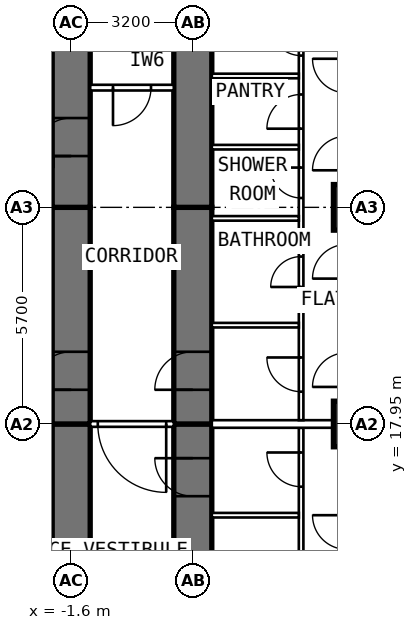
"""IFC4 building model, lengths in metres.
Left out: names, types, materials, properties, quantities, classifications, styles, units other than length and angle.
Written with IfcOpenShell. Run it as: python <this file> out.ifc"""

import sys

from ifc_helpers import new_model, si_unit, direction, frame, frame_2d, origin, origin_2d, place, context, subcontext, project, spatial, rectangle, extrude, element, fill, save


model = new_model("IFC4")
c1 = context("Model", 3, precision=1e-05, world=origin(), true_north=direction((0.0, 1.0)))
c2 = subcontext(c1, "Body", "Model", "MODEL_VIEW")
j1 = project(units=[si_unit("LENGTHUNIT", "METRE"), si_unit("PLANEANGLEUNIT", "RADIAN")], contexts=[c1])
p1 = place(None, origin())
s1 = spatial("IfcSite", under=j1, at=p1, CompositionType="ELEMENT")
p2 = place(p1, origin())
s2 = spatial("IfcBuilding", under=s1, at=p2, CompositionType="ELEMENT")
p3 = place(p2, frame((0.0, 0.0, 102.4)))
s3 = spatial("IfcBuildingStorey", under=s2, at=p3, CompositionType="ELEMENT", Elevation=102.4)
for number, where, z_axis, x_axis in (
    (1, (5.9, 17.95, 0.0), (0.0, 0.0, 1.0), (0.0, 1.0, 0.0)),
    (2, (5.9, 23.65, 0.0), (0.0, 0.0, 1.0), (0.0, 1.0, 0.0)),
):
    element("IfcColumn", number, at=place(p3, frame(where, z_axis=z_axis, x_axis=x_axis)), inside=s3, PredefinedType="COLUMN", context=c2, shape_type="SweptSolid", body=[
        extrude(rectangle(XDim=1.2, YDim=1.2, at=origin_2d()), origin(), (0.0, 0.0, 1.0), 3.6),
    ])
p4 = place(p3, frame((-1.6, 9.6, 0.0), z_axis=(0.0, 0.0, 1.0), x_axis=(0.0, 1.0, 0.0)))
e3 = element("IfcWall", 3, at=p4, inside=s3, PredefinedType="SHEAR", context=c2, shape_type="SweptSolid", body=[
    extrude(rectangle(XDim=8.35, YDim=1.0, at=frame_2d((4.175, 0.0))), origin(), (0.0, 0.0, 1.0), 3.6),
])
p5 = place(p4, frame((1.3, 0.0, 0.0)))
e4 = element("IfcOpeningElement", 4, at=p5, cuts=e3, PredefinedType="OPENING", context=c2, shape_type="SweptSolid", body=[
    extrude(rectangle(XDim=1.0, YDim=2.1, at=frame_2d((0.5, 1.05))), frame((0.0, 0.512, 0.0), z_axis=(0.0, -1.0, 0.0), x_axis=(1.0, 0.0, 0.0)), (0.0, 0.0, 1.0), 1.024),
])
p6 = place(p3, frame((-1.6, 17.95, 0.0), z_axis=(0.0, 0.0, 1.0), x_axis=(0.0, 1.0, 0.0)))
e5 = element("IfcWall", 5, at=p6, inside=s3, PredefinedType="SHEAR", context=c2, shape_type="SweptSolid", body=[
    extrude(rectangle(XDim=5.7, YDim=1.0, at=frame_2d((2.85, 0.0))), origin(), (0.0, 0.0, 1.0), 3.6),
])
p7 = place(p6, frame((0.9, 0.0, 0.0)))
e6 = element("IfcOpeningElement", 6, at=p7, cuts=e5, PredefinedType="OPENING", context=c2, shape_type="SweptSolid", body=[
    extrude(rectangle(XDim=1.0, YDim=2.1, at=frame_2d((0.5, 1.05))), frame((0.0, 0.512, 0.0), z_axis=(0.0, -1.0, 0.0), x_axis=(1.0, 0.0, 0.0)), (0.0, 0.0, 1.0), 1.024),
])
p8 = place(p3, frame((-1.6, 23.65, 0.0), z_axis=(0.0, 0.0, 1.0), x_axis=(0.0, 1.0, 0.0)))
e7 = element("IfcWall", 7, at=p8, inside=s3, PredefinedType="SHEAR", context=c2, shape_type="SweptSolid", body=[
    extrude(rectangle(XDim=10.745, YDim=1.0, at=frame_2d((5.373, 0.0))), origin(), (0.0, 0.0, 1.0), 3.6),
])
p9 = place(p8, frame((1.35, 0.0, 0.0)))
e8 = element("IfcOpeningElement", 8, at=p9, cuts=e7, PredefinedType="OPENING", context=c2, shape_type="SweptSolid", body=[
    extrude(rectangle(XDim=1.0, YDim=2.1, at=frame_2d((0.5, 1.05))), frame((0.0, 0.512, 0.0), z_axis=(0.0, -1.0, 0.0), x_axis=(1.0, 0.0, 0.0)), (0.0, 0.0, 1.0), 1.024),
])
p10 = place(p3, frame((1.6, 9.6, 0.0), z_axis=(0.0, 0.0, 1.0), x_axis=(0.0, 1.0, 0.0)))
e9 = element("IfcWall", 9, at=p10, inside=s3, PredefinedType="SHEAR", context=c2, shape_type="SweptSolid", body=[
    extrude(rectangle(XDim=8.35, YDim=1.0, at=frame_2d((4.175, 0.0))), origin(), (0.0, 0.0, 1.0), 3.6),
])
p11 = place(p10, frame((6.45, 0.0, 0.0)))
e10 = element("IfcOpeningElement", 10, at=p11, cuts=e9, PredefinedType="OPENING", context=c2, shape_type="SweptSolid", body=[
    extrude(rectangle(XDim=1.0, YDim=2.1, at=frame_2d((0.5, 1.05))), frame((0.0, 0.512, 0.0), z_axis=(0.0, -1.0, 0.0), x_axis=(1.0, 0.0, 0.0)), (0.0, 0.0, 1.0), 1.024),
])
p12 = place(p3, frame((1.6, 17.95, 0.0), z_axis=(0.0, 0.0, 1.0), x_axis=(0.0, 1.0, 0.0)))
e11 = element("IfcWall", 11, at=p12, inside=s3, PredefinedType="SHEAR", context=c2, shape_type="SweptSolid", body=[
    extrude(rectangle(XDim=5.7, YDim=1.0, at=frame_2d((2.85, 0.0))), origin(), (0.0, 0.0, 1.0), 3.6),
])
p13 = place(p12, frame((0.9, 0.0, 0.0)))
e12 = element("IfcOpeningElement", 12, at=p13, cuts=e11, PredefinedType="OPENING", context=c2, shape_type="SweptSolid", body=[
    extrude(rectangle(XDim=1.0, YDim=2.1, at=frame_2d((0.5, 1.05))), frame((0.0, 0.512, 0.0), z_axis=(0.0, -1.0, 0.0), x_axis=(1.0, 0.0, 0.0)), (0.0, 0.0, 1.0), 1.024),
])
p14 = place(p3, frame((1.6, 23.65, 0.0), z_axis=(0.0, 0.0, 1.0), x_axis=(0.0, 1.0, 0.0)))
e13 = element("IfcWall", 13, at=p14, inside=s3, PredefinedType="SHEAR", context=c2, shape_type="SweptSolid", body=[
    extrude(rectangle(XDim=10.745, YDim=1.0, at=frame_2d((5.373, 0.0))), origin(), (0.0, 0.0, 1.0), 3.6),
])
p15 = place(p3, frame((-2.1, 15.1, 0.0), z_axis=(0.0, 0.0, 1.0), x_axis=(-1.0, 0.0, 0.0)))
e14 = element("IfcWall", 14, at=p15, inside=s3, PredefinedType="PARTITIONING", context=c2, shape_type="SweptSolid", body=[
    extrude(rectangle(XDim=8.6, YDim=0.2, at=frame_2d((4.3, 0.0))), origin(), (0.0, 0.0, 1.0), 3.35),
])
p16 = place(p3, frame((4.45, 10.1, 0.0), z_axis=(0.0, 0.0, 1.0), x_axis=(0.0, 1.0, 0.0)))
e15 = element("IfcWall", 15, at=p16, inside=s3, PredefinedType="PARTITIONING", context=c2, shape_type="SweptSolid", body=[
    extrude(rectangle(XDim=7.75, YDim=0.12, at=frame_2d((3.875, 0.0))), origin(), (0.0, 0.0, 1.0), 3.35),
])
p17 = place(p16, frame((0.56, 0.0, 0.0)))
e16 = element("IfcOpeningElement", 16, at=p17, cuts=e15, PredefinedType="OPENING", context=c2, shape_type="SweptSolid", body=[
    extrude(rectangle(XDim=0.9, YDim=2.1, at=frame_2d((0.45, 1.05))), frame((0.0, 0.072, 0.0), z_axis=(0.0, -1.0, 0.0), x_axis=(1.0, 0.0, 0.0)), (0.0, 0.0, 1.0), 0.144),
])
p18 = place(p16, frame((3.385, 0.0, 0.0)))
e17 = element("IfcOpeningElement", 17, at=p18, cuts=e15, PredefinedType="OPENING", context=c2, shape_type="SweptSolid", body=[
    extrude(rectangle(XDim=0.8, YDim=2.1, at=frame_2d((0.4, 1.05))), frame((0.0, 0.072, 0.0), z_axis=(0.0, -1.0, 0.0), x_axis=(1.0, 0.0, 0.0)), (0.0, 0.0, 1.0), 0.144),
])
p19 = place(p16, frame((6.2, 0.0, 0.0)))
e18 = element("IfcOpeningElement", 18, at=p19, cuts=e15, PredefinedType="OPENING", context=c2, shape_type="SweptSolid", body=[
    extrude(rectangle(XDim=0.9, YDim=2.1, at=frame_2d((0.45, 1.05))), frame((0.0, 0.072, 0.0), z_axis=(0.0, -1.0, 0.0), x_axis=(1.0, 0.0, 0.0)), (0.0, 0.0, 1.0), 0.144),
])
p20 = place(p3, frame((2.1, 15.55, 0.0), z_axis=(0.0, 0.0, 1.0), x_axis=(1.0, 0.0, 0.0)))
e19 = element("IfcWall", 19, at=p20, inside=s3, PredefinedType="PARTITIONING", context=c2, shape_type="SweptSolid", body=[
    extrude(rectangle(XDim=2.29, YDim=0.12, at=frame_2d((1.145, 0.0))), origin(), (0.0, 0.0, 1.0), 3.35),
])
p21 = place(p3, frame((4.45, 18.05, 0.0), z_axis=(0.0, 0.0, 1.0), x_axis=(0.0, 1.0, 0.0)))
e20 = element("IfcWall", 20, at=p21, inside=s3, PredefinedType="PARTITIONING", context=c2, shape_type="SweptSolid", body=[
    extrude(rectangle(XDim=16.345, YDim=0.12, at=frame_2d((8.172, 0.0))), origin(), (0.0, 0.0, 1.0), 3.35),
])
p22 = place(p21, frame((0.75, 0.0, 0.0)))
e21 = element("IfcOpeningElement", 21, at=p22, cuts=e20, PredefinedType="OPENING", context=c2, shape_type="SweptSolid", body=[
    extrude(rectangle(XDim=0.9, YDim=2.1, at=frame_2d((0.45, 1.05))), frame((0.0, 0.072, 0.0), z_axis=(0.0, -1.0, 0.0), x_axis=(1.0, 0.0, 0.0)), (0.0, 0.0, 1.0), 0.144),
])
p23 = place(p21, frame((3.505, 0.0, 0.0)))
e22 = element("IfcOpeningElement", 22, at=p23, cuts=e20, PredefinedType="OPENING", context=c2, shape_type="SweptSolid", body=[
    extrude(rectangle(XDim=0.8, YDim=2.1, at=frame_2d((0.4, 1.05))), frame((0.0, 0.072, 0.0), z_axis=(0.0, -1.0, 0.0), x_axis=(1.0, 0.0, 0.0)), (0.0, 0.0, 1.0), 0.144),
])
p24 = place(p21, frame((5.847, 0.0, 0.0)))
e23 = element("IfcOpeningElement", 23, at=p24, cuts=e20, PredefinedType="OPENING", context=c2, shape_type="SweptSolid", body=[
    extrude(rectangle(XDim=0.8, YDim=2.1, at=frame_2d((0.4, 1.05))), frame((0.0, 0.072, 0.0), z_axis=(0.0, -1.0, 0.0), x_axis=(1.0, 0.0, 0.0)), (0.0, 0.0, 1.0), 0.144),
])
p25 = place(p21, frame((7.67, 0.0, 0.0)))
e24 = element("IfcOpeningElement", 24, at=p25, cuts=e20, PredefinedType="OPENING", context=c2, shape_type="SweptSolid", body=[
    extrude(rectangle(XDim=0.9, YDim=2.1, at=frame_2d((0.45, 1.05))), frame((0.0, 0.072, 0.0), z_axis=(0.0, -1.0, 0.0), x_axis=(1.0, 0.0, 0.0)), (0.0, 0.0, 1.0), 0.144),
])
p26 = place(p21, frame((9.593, 0.0, 0.0)))
e25 = element("IfcOpeningElement", 25, at=p26, cuts=e20, PredefinedType="OPENING", context=c2, shape_type="SweptSolid", body=[
    extrude(rectangle(XDim=0.8, YDim=2.1, at=frame_2d((0.4, 1.05))), frame((0.0, 0.072, 0.0), z_axis=(0.0, -1.0, 0.0), x_axis=(1.0, 0.0, 0.0)), (0.0, 0.0, 1.0), 0.144),
])
p27 = place(p21, frame((11.467, 0.0, 0.0)))
e26 = element("IfcOpeningElement", 26, at=p27, cuts=e20, PredefinedType="OPENING", context=c2, shape_type="SweptSolid", body=[
    extrude(rectangle(XDim=0.8, YDim=2.1, at=frame_2d((0.4, 1.05))), frame((0.0, 0.072, 0.0), z_axis=(0.0, -1.0, 0.0), x_axis=(1.0, 0.0, 0.0)), (0.0, 0.0, 1.0), 0.144),
])
p28 = place(p21, frame((13.29, 0.0, 0.0)))
e27 = element("IfcOpeningElement", 27, at=p28, cuts=e20, PredefinedType="OPENING", context=c2, shape_type="SweptSolid", body=[
    extrude(rectangle(XDim=0.9, YDim=2.1, at=frame_2d((0.45, 1.05))), frame((0.0, 0.072, 0.0), z_axis=(0.0, -1.0, 0.0), x_axis=(1.0, 0.0, 0.0)), (0.0, 0.0, 1.0), 0.144),
])
p29 = place(p21, frame((14.837, 0.0, 0.0)))
e28 = element("IfcOpeningElement", 28, at=p29, cuts=e20, PredefinedType="OPENING", context=c2, shape_type="SweptSolid", body=[
    extrude(rectangle(XDim=0.9, YDim=2.1, at=frame_2d((0.45, 1.05))), frame((0.0, 0.072, 0.0), z_axis=(0.0, -1.0, 0.0), x_axis=(1.0, 0.0, 0.0)), (0.0, 0.0, 1.0), 0.144),
])
p30 = place(p3, frame((2.1, 20.55, 0.0), z_axis=(0.0, 0.0, 1.0), x_axis=(1.0, 0.0, 0.0)))
e29 = element("IfcWall", 29, at=p30, inside=s3, PredefinedType="PARTITIONING", context=c2, shape_type="SweptSolid", body=[
    extrude(rectangle(XDim=2.29, YDim=0.12, at=frame_2d((1.145, 0.0))), origin(), (0.0, 0.0, 1.0), 3.35),
])
p31 = place(p3, frame((2.1, 23.36, 0.0), z_axis=(0.0, 0.0, 1.0), x_axis=(1.0, 0.0, 0.0)))
e30 = element("IfcWall", 30, at=p31, inside=s3, PredefinedType="PARTITIONING", context=c2, shape_type="SweptSolid", body=[
    extrude(rectangle(XDim=2.29, YDim=0.12, at=frame_2d((1.145, 0.0))), origin(), (0.0, 0.0, 1.0), 2.45),
])
for number, where, z_axis, x_axis in (
    (31, (2.1, 25.233, 0.0), (0.0, 0.0, 1.0), (1.0, 0.0, 0.0)),
    (32, (2.1, 27.107, 0.0), (0.0, 0.0, 1.0), (1.0, 0.0, 0.0)),
):
    element("IfcWall", number, at=place(p3, frame(where, z_axis=z_axis, x_axis=x_axis)), inside=s3, PredefinedType="PARTITIONING", context=c2, shape_type="SweptSolid", body=[
        extrude(rectangle(XDim=2.29, YDim=0.12, at=frame_2d((1.145, 0.0))), origin(), (0.0, 0.0, 1.0), 3.35),
    ])
p32 = place(p3, frame((2.1, 17.95, 0.0), z_axis=(0.0, 0.0, 1.0), x_axis=(1.0, 0.0, 0.0)))
e33 = element("IfcWall", 33, at=p32, inside=s3, PredefinedType="PARTITIONING", context=c2, shape_type="SweptSolid", body=[
    extrude(rectangle(XDim=8.6, YDim=0.2, at=frame_2d((4.3, 0.0))), origin(), (0.0, 0.0, 1.0), 2.45),
])
p33 = place(p3, frame((1.1, 26.8, 0.0), z_axis=(0.0, 0.0, 1.0), x_axis=(-1.0, 0.0, 0.0)))
e34 = element("IfcWall", 34, at=p33, inside=s3, PredefinedType="PARTITIONING", context=c2, shape_type="SweptSolid", body=[
    extrude(rectangle(XDim=2.2, YDim=0.15, at=frame_2d((1.1, 0.0))), origin(), (0.0, 0.0, 1.0), 3.35),
])
p34 = place(p33, frame((0.6, 0.0, 0.0)))
e35 = element("IfcOpeningElement", 35, at=p34, cuts=e34, PredefinedType="OPENING", context=c2, shape_type="SweptSolid", body=[
    extrude(rectangle(XDim=1.0, YDim=2.1, at=frame_2d((0.5, 1.05))), frame((0.0, 0.087, 0.0), z_axis=(0.0, -1.0, 0.0), x_axis=(1.0, 0.0, 0.0)), (0.0, 0.0, 1.0), 0.174),
])
p35 = place(p3, frame((1.1, 17.95, 0.0), z_axis=(0.0, 0.0, 1.0), x_axis=(-1.0, 0.0, 0.0)))
e36 = element("IfcWall", 36, at=p35, inside=s3, PredefinedType="PARTITIONING", context=c2, shape_type="SweptSolid", body=[
    extrude(rectangle(XDim=2.2, YDim=0.15, at=frame_2d((1.1, 0.0))), origin(), (0.0, 0.0, 1.0), 3.35),
])
p36 = place(p35, frame((0.2, 0.0, 0.0)))
e37 = element("IfcOpeningElement", 37, at=p36, cuts=e36, PredefinedType="OPENING", context=c2, shape_type="SweptSolid", body=[
    extrude(rectangle(XDim=1.8, YDim=2.1, at=frame_2d((0.9, 1.05))), frame((0.0, 0.087, 0.0), z_axis=(0.0, -1.0, 0.0), x_axis=(1.0, 0.0, 0.0)), (0.0, 0.0, 1.0), 0.174),
])
p37 = place(p7, origin())
e38 = element("IfcDoor", 38, at=p37, inside=s3, OperationType="SINGLE_SWING_LEFT", PredefinedType="DOOR", context=c2, shape_type="SweptSolid", body=[
    extrude(rectangle(XDim=1.0, YDim=2.1, at=frame_2d((0.5, 1.05))), frame((0.0, 0.25, 0.0), z_axis=(0.0, -1.0, 0.0), x_axis=(1.0, 0.0, 0.0)), (0.0, 0.0, 1.0), 0.5),
])
fill(e6, e38)
p38 = place(p11, origin())
e39 = element("IfcDoor", 39, at=p38, inside=s3, OperationType="SINGLE_SWING_RIGHT", PredefinedType="DOOR", context=c2, shape_type="SweptSolid", body=[
    extrude(rectangle(XDim=1.0, YDim=2.1, at=frame_2d((0.5, 1.05))), frame((0.0, 0.25, 0.0), z_axis=(0.0, -1.0, 0.0), x_axis=(1.0, 0.0, 0.0)), (0.0, 0.0, 1.0), 0.5),
])
fill(e10, e39)
p39 = place(p19, origin())
e40 = element("IfcDoor", 40, at=p39, inside=s3, OperationType="SINGLE_SWING_RIGHT", PredefinedType="DOOR", context=c2, shape_type="SweptSolid", body=[
    extrude(rectangle(XDim=0.9, YDim=2.1, at=frame_2d((0.45, 1.05))), frame((0.0, 0.025, 0.0), z_axis=(0.0, -1.0, 0.0), x_axis=(1.0, 0.0, 0.0)), (0.0, 0.0, 1.0), 0.05),
])
fill(e18, e40)
p40 = place(p13, origin())
e41 = element("IfcDoor", 41, at=p40, inside=s3, OperationType="SINGLE_SWING_LEFT", PredefinedType="DOOR", context=c2, shape_type="SweptSolid", body=[
    extrude(rectangle(XDim=1.0, YDim=2.1, at=frame_2d((0.5, 1.05))), frame((0.0, 0.25, 0.0), z_axis=(0.0, -1.0, 0.0), x_axis=(1.0, 0.0, 0.0)), (0.0, 0.0, 1.0), 0.5),
])
fill(e12, e41)
p41 = place(p22, origin())
e42 = element("IfcDoor", 42, at=p41, inside=s3, OperationType="SINGLE_SWING_RIGHT", PredefinedType="DOOR", context=c2, shape_type="SweptSolid", body=[
    extrude(rectangle(XDim=0.9, YDim=2.1, at=frame_2d((0.45, 1.05))), frame((0.0, 0.025, 0.0), z_axis=(0.0, -1.0, 0.0), x_axis=(1.0, 0.0, 0.0)), (0.0, 0.0, 1.0), 0.05),
])
fill(e21, e42)
p42 = place(p23, origin())
e43 = element("IfcDoor", 43, at=p42, inside=s3, OperationType="SINGLE_SWING_LEFT", PredefinedType="DOOR", context=c2, shape_type="SweptSolid", body=[
    extrude(rectangle(XDim=0.8, YDim=2.1, at=frame_2d((0.4, 1.05))), frame((0.0, 0.025, 0.0), z_axis=(0.0, -1.0, 0.0), x_axis=(1.0, 0.0, 0.0)), (0.0, 0.0, 1.0), 0.05),
])
fill(e22, e43)
p43 = place(p24, origin())
e44 = element("IfcDoor", 44, at=p43, inside=s3, OperationType="SINGLE_SWING_RIGHT", PredefinedType="DOOR", context=c2, shape_type="SweptSolid", body=[
    extrude(rectangle(XDim=0.8, YDim=2.1, at=frame_2d((0.4, 1.05))), frame((0.0, 0.025, 0.0), z_axis=(0.0, -1.0, 0.0), x_axis=(1.0, 0.0, 0.0)), (0.0, 0.0, 1.0), 0.05),
])
fill(e23, e44)
p44 = place(p25, origin())
e45 = element("IfcDoor", 45, at=p44, inside=s3, OperationType="SINGLE_SWING_LEFT", PredefinedType="DOOR", context=c2, shape_type="SweptSolid", body=[
    extrude(rectangle(XDim=0.9, YDim=2.1, at=frame_2d((0.45, 1.05))), frame((0.0, 0.025, 0.0), z_axis=(0.0, -1.0, 0.0), x_axis=(1.0, 0.0, 0.0)), (0.0, 0.0, 1.0), 0.05),
])
fill(e24, e45)
p45 = place(p26, origin())
e46 = element("IfcDoor", 46, at=p45, inside=s3, OperationType="SINGLE_SWING_RIGHT", PredefinedType="DOOR", context=c2, shape_type="SweptSolid", body=[
    extrude(rectangle(XDim=0.8, YDim=2.1, at=frame_2d((0.4, 1.05))), frame((0.0, 0.025, 0.0), z_axis=(0.0, -1.0, 0.0), x_axis=(1.0, 0.0, 0.0)), (0.0, 0.0, 1.0), 0.05),
])
fill(e25, e46)
p46 = place(p34, origin())
e47 = element("IfcDoor", 47, at=p46, inside=s3, OperationType="SINGLE_SWING_RIGHT", PredefinedType="DOOR", context=c2, shape_type="SweptSolid", body=[
    extrude(rectangle(XDim=1.0, YDim=2.1, at=frame_2d((0.5, 1.05))), frame((0.0, 0.025, 0.0), z_axis=(0.0, -1.0, 0.0), x_axis=(1.0, 0.0, 0.0)), (0.0, 0.0, 1.0), 0.05),
])
fill(e35, e47)
p47 = place(p36, origin())
e48 = element("IfcDoor", 48, at=p47, inside=s3, OperationType="DOUBLE_DOOR_DOUBLE_SWING", PredefinedType="DOOR", context=c2, shape_type="SweptSolid", body=[
    extrude(rectangle(XDim=1.8, YDim=2.1, at=frame_2d((0.9, 1.05))), frame((0.0, 0.025, 0.0), z_axis=(0.0, -1.0, 0.0), x_axis=(1.0, 0.0, 0.0)), (0.0, 0.0, 1.0), 0.05),
])
fill(e37, e48)
p48 = place(p9, origin())
e49 = element("IfcDoor", 49, at=p48, inside=s3, OperationType="SINGLE_SWING_LEFT", PredefinedType="DOOR", context=c2, shape_type="SweptSolid", body=[
    extrude(rectangle(XDim=1.0, YDim=2.1, at=frame_2d((0.5, 1.05))), frame((0.0, 0.25, 0.0), z_axis=(0.0, -1.0, 0.0), x_axis=(1.0, 0.0, 0.0)), (0.0, 0.0, 1.0), 0.5),
])
fill(e8, e49)
save(model, sys.argv[1])
